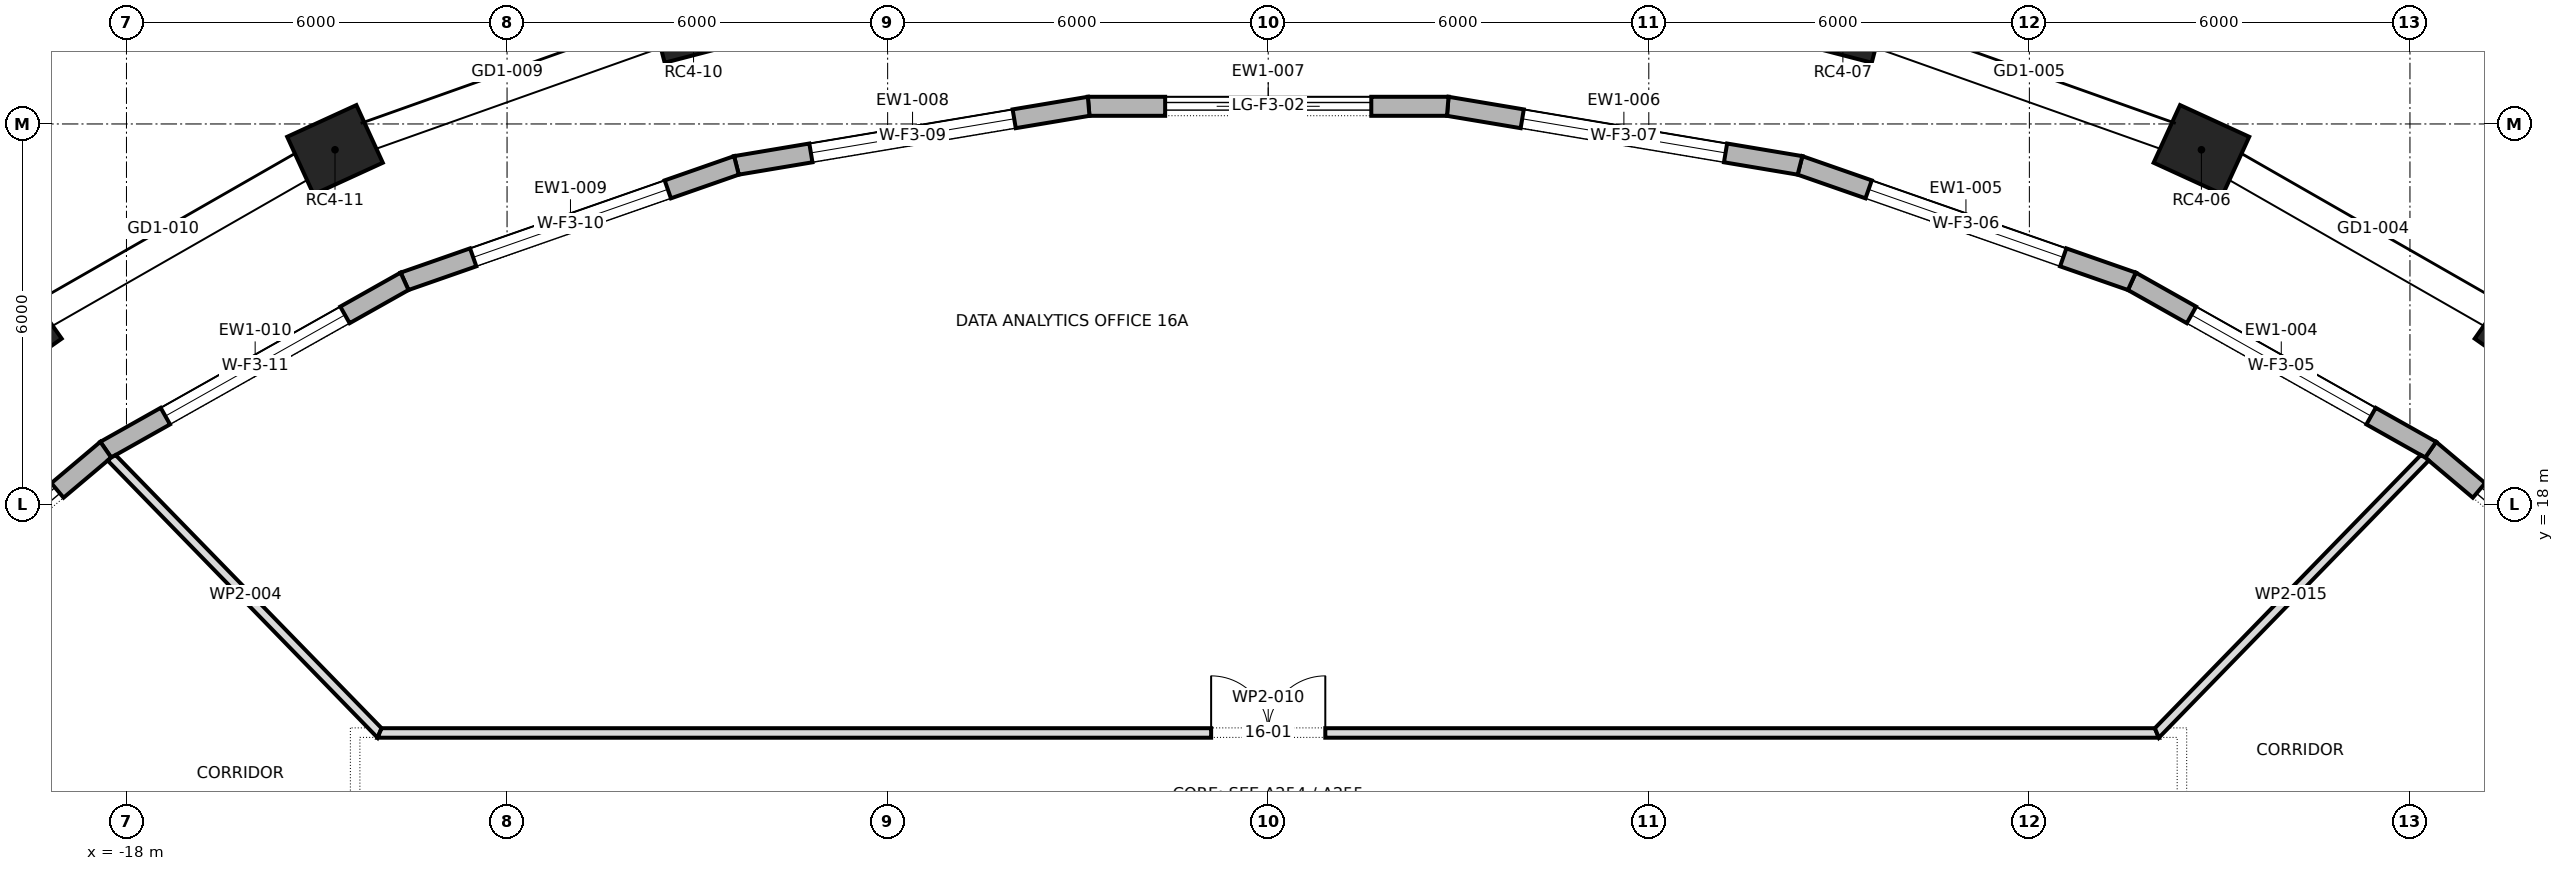
"""IFC4 building model, lengths in metres.
Left out: names, types, materials, properties, quantities, classifications, styles, units other than length and angle.
Written with IfcOpenShell. Run it as: python <this file> out.ifc"""

import sys

from ifc_helpers import new_model, si_unit, direction, frame, frame_2d, origin, origin_2d, place, context, subcontext, project, spatial, polyline, rectangle, outline, extrude, element, fill, save


model = new_model("IFC4")
c1 = context("Model", 3, precision=1e-05, world=origin(), true_north=direction((0.0, 1.0)))
c2 = subcontext(c1, "Body", "Model", "MODEL_VIEW")
j1 = project(units=[si_unit("LENGTHUNIT", "METRE"), si_unit("PLANEANGLEUNIT", "RADIAN")], contexts=[c1])
p1 = place(None, origin())
s1 = spatial("IfcSite", under=j1, at=p1, CompositionType="ELEMENT")
p2 = place(p1, origin())
s2 = spatial("IfcBuilding", under=s1, at=p2, CompositionType="ELEMENT")
p3 = place(p2, frame((0.0, 0.0, 234.9)))
s3 = spatial("IfcBuildingStorey", under=s2, at=p3, CompositionType="ELEMENT", Elevation=234.9)
for number, where, z_axis, x_axis in (
    (1, (19.8, 20.679, 0.0), (0.0, 0.0, 1.0), (-0.818, 0.575, 0.0)),
    (2, (14.712, 23.593, 0.0), (0.0, 0.0, 1.0), (-0.909, 0.417, 0.0)),
    (3, (9.06, 25.6, 0.0), (0.0, 0.0, 1.0), (-0.968, 0.252, 0.0)),
    (4, (-9.06, 25.6, 0.0), (0.0, 0.0, 1.0), (-0.968, -0.252, 0.0)),
    (5, (-14.712, 23.593, 0.0), (0.0, 0.0, 1.0), (-0.909, -0.417, 0.0)),
    (6, (-19.8, 20.679, 0.0), (0.0, 0.0, 1.0), (-0.818, -0.575, 0.0)),
):
    element("IfcColumn", number, at=place(p3, frame(where, z_axis=z_axis, x_axis=x_axis)), inside=s3, PredefinedType="COLUMN", context=c2, shape_type="SweptSolid", body=[
        extrude(rectangle(XDim=1.2, YDim=1.0, at=origin_2d()), origin(), (0.0, 0.0, 1.0), 4.0),
    ])
p4 = place(p3, frame((22.334, 15.486, 0.0), z_axis=(0.0, 0.0, 1.0), x_axis=(-0.764475071601, 0.644653290459, 0.0)))
e7 = element("IfcWall", 7, at=p4, inside=s3, PredefinedType="STANDARD", context=c2, shape_type="SweptSolid", body=[
    extrude(outline(polyline([(-0.015, -0.15), (5.257, -0.15), (5.229, 0.15), (0.015, 0.15), (-0.015, -0.15)])), origin(), (0.0, 0.0, 1.0), 3.7),
])
p5 = place(p4, frame((0.996, 0.0, 0.0)))
e8 = element("IfcOpeningElement", 8, at=p5, cuts=e7, PredefinedType="OPENING", context=c2, shape_type="SweptSolid", body=[
    extrude(rectangle(XDim=3.25, YDim=3.25, at=frame_2d((1.625, 1.625))), frame((0.0, 0.162, 0.0), z_axis=(0.0, -1.0, 0.0), x_axis=(1.0, 0.0, 0.0)), (0.0, 0.0, 1.0), 0.324),
])
p6 = place(p3, frame((18.326, 18.865, 0.0), z_axis=(0.0, 0.0, 1.0), x_axis=(-0.871225596594, 0.490882837181, 0.0)))
e9 = element("IfcWall", 9, at=p6, inside=s3, PredefinedType="STANDARD", context=c2, shape_type="SweptSolid", body=[
    extrude(outline(polyline([(-0.014, -0.15), (5.42, -0.15), (5.393, 0.15), (0.014, 0.15), (-0.014, -0.15)])), origin(), (0.0, 0.0, 1.0), 3.7),
])
p7 = place(p6, frame((1.078, 0.0, 0.6)))
e10 = element("IfcOpeningElement", 10, at=p7, cuts=e9, PredefinedType="OPENING", context=c2, shape_type="SweptSolid", body=[
    extrude(rectangle(XDim=3.25, YDim=2.65, at=frame_2d((1.625, 1.325))), frame((0.0, 0.162, 0.0), z_axis=(0.0, -1.0, 0.0), x_axis=(1.0, 0.0, 0.0)), (0.0, 0.0, 1.0), 0.324),
])
p8 = place(p3, frame((13.616, 21.52, 0.0), z_axis=(0.0, 0.0, 1.0), x_axis=(-0.944075859918, 0.329728328659, 0.0)))
e11 = element("IfcWall", 11, at=p8, inside=s3, PredefinedType="STANDARD", context=c2, shape_type="SweptSolid", body=[
    extrude(outline(polyline([(-0.013, -0.15), (5.555, -0.15), (5.53, 0.15), (0.013, 0.15), (-0.013, -0.15)])), origin(), (0.0, 0.0, 1.0), 3.7),
])
p9 = place(p8, frame((1.146, 0.0, 0.6)))
e12 = element("IfcOpeningElement", 12, at=p9, cuts=e11, PredefinedType="OPENING", context=c2, shape_type="SweptSolid", body=[
    extrude(rectangle(XDim=3.25, YDim=2.65, at=frame_2d((1.625, 1.325))), frame((0.0, 0.162, 0.0), z_axis=(0.0, -1.0, 0.0), x_axis=(1.0, 0.0, 0.0)), (0.0, 0.0, 1.0), 0.324),
])
p10 = place(p3, frame((8.384, 23.347, 0.0), z_axis=(0.0, 0.0, 1.0), x_axis=(-0.986223472554, 0.165418445715, 0.0)))
e13 = element("IfcWall", 13, at=p10, inside=s3, PredefinedType="STANDARD", context=c2, shape_type="SweptSolid", body=[
    extrude(outline(polyline([(-0.013, -0.15), (5.643, -0.15), (5.618, 0.15), (0.013, 0.15), (-0.013, -0.15)])), origin(), (0.0, 0.0, 1.0), 3.7),
])
p11 = place(p10, frame((1.19, 0.0, 0.6)))
e14 = element("IfcOpeningElement", 14, at=p11, cuts=e13, PredefinedType="OPENING", context=c2, shape_type="SweptSolid", body=[
    extrude(rectangle(XDim=3.25, YDim=2.65, at=frame_2d((1.625, 1.325))), frame((0.0, 0.162, 0.0), z_axis=(0.0, -1.0, 0.0), x_axis=(1.0, 0.0, 0.0)), (0.0, 0.0, 1.0), 0.324),
])
p12 = place(p3, frame((2.831, 24.278, 0.0), z_axis=(0.0, 0.0, 1.0), x_axis=(-1.0, 0.0, 0.0)))
e15 = element("IfcWall", 15, at=p12, inside=s3, PredefinedType="STANDARD", context=c2, shape_type="SweptSolid", body=[
    extrude(outline(polyline([(-0.012, -0.15), (5.674, -0.15), (5.649, 0.15), (0.012, 0.15), (-0.012, -0.15)])), origin(), (0.0, 0.0, 1.0), 3.7),
])
p13 = place(p12, frame((1.206, 0.0, 0.0)))
e16 = element("IfcOpeningElement", 16, at=p13, cuts=e15, PredefinedType="OPENING", context=c2, shape_type="SweptSolid", body=[
    extrude(rectangle(XDim=3.25, YDim=3.25, at=frame_2d((1.625, 1.625))), frame((0.0, 0.162, 0.0), z_axis=(0.0, -1.0, 0.0), x_axis=(1.0, 0.0, 0.0)), (0.0, 0.0, 1.0), 0.324),
])
p14 = place(p3, frame((-2.831, 24.278, 0.0), z_axis=(0.0, 0.0, 1.0), x_axis=(-0.986223472554, -0.165418445715, 0.0)))
e17 = element("IfcWall", 17, at=p14, inside=s3, PredefinedType="STANDARD", context=c2, shape_type="SweptSolid", body=[
    extrude(outline(polyline([(-0.012, -0.15), (5.643, -0.15), (5.618, 0.15), (0.012, 0.15), (-0.012, -0.15)])), origin(), (0.0, 0.0, 1.0), 3.7),
])
p15 = place(p14, frame((1.19, 0.0, 0.6)))
e18 = element("IfcOpeningElement", 18, at=p15, cuts=e17, PredefinedType="OPENING", context=c2, shape_type="SweptSolid", body=[
    extrude(rectangle(XDim=3.25, YDim=2.65, at=frame_2d((1.625, 1.325))), frame((0.0, 0.162, 0.0), z_axis=(0.0, -1.0, 0.0), x_axis=(1.0, 0.0, 0.0)), (0.0, 0.0, 1.0), 0.324),
])
p16 = place(p3, frame((-8.384, 23.347, 0.0), z_axis=(0.0, 0.0, 1.0), x_axis=(-0.944075859918, -0.329728328659, 0.0)))
e19 = element("IfcWall", 19, at=p16, inside=s3, PredefinedType="STANDARD", context=c2, shape_type="SweptSolid", body=[
    extrude(outline(polyline([(-0.013, -0.15), (5.556, -0.15), (5.529, 0.15), (0.013, 0.15), (-0.013, -0.15)])), origin(), (0.0, 0.0, 1.0), 3.7),
])
p17 = place(p16, frame((1.146, 0.0, 0.6)))
e20 = element("IfcOpeningElement", 20, at=p17, cuts=e19, PredefinedType="OPENING", context=c2, shape_type="SweptSolid", body=[
    extrude(rectangle(XDim=3.25, YDim=2.65, at=frame_2d((1.625, 1.325))), frame((0.0, 0.162, 0.0), z_axis=(0.0, -1.0, 0.0), x_axis=(1.0, 0.0, 0.0)), (0.0, 0.0, 1.0), 0.324),
])
p18 = place(p3, frame((-13.616, 21.52, 0.0), z_axis=(0.0, 0.0, 1.0), x_axis=(-0.871225596594, -0.490882837181, 0.0)))
e21 = element("IfcWall", 21, at=p18, inside=s3, PredefinedType="STANDARD", context=c2, shape_type="SweptSolid", body=[
    extrude(outline(polyline([(-0.013, -0.15), (5.421, -0.15), (5.393, 0.15), (0.013, 0.15), (-0.013, -0.15)])), origin(), (0.0, 0.0, 1.0), 3.7),
])
p19 = place(p18, frame((1.078, 0.0, 0.6)))
e22 = element("IfcOpeningElement", 22, at=p19, cuts=e21, PredefinedType="OPENING", context=c2, shape_type="SweptSolid", body=[
    extrude(rectangle(XDim=3.25, YDim=2.65, at=frame_2d((1.625, 1.325))), frame((0.0, 0.162, 0.0), z_axis=(0.0, -1.0, 0.0), x_axis=(1.0, 0.0, 0.0)), (0.0, 0.0, 1.0), 0.324),
])
p20 = place(p3, frame((-18.326, 18.865, 0.0), z_axis=(0.0, 0.0, 1.0), x_axis=(-0.764475071601, -0.644653290459, 0.0)))
e23 = element("IfcWall", 23, at=p20, inside=s3, PredefinedType="STANDARD", context=c2, shape_type="SweptSolid", body=[
    extrude(outline(polyline([(-0.014, -0.15), (5.258, -0.15), (5.228, 0.15), (0.014, 0.15), (-0.014, -0.15)])), origin(), (0.0, 0.0, 1.0), 3.7),
])
p21 = place(p20, frame((0.996, 0.0, 0.0)))
e24 = element("IfcOpeningElement", 24, at=p21, cuts=e23, PredefinedType="OPENING", context=c2, shape_type="SweptSolid", body=[
    extrude(rectangle(XDim=3.25, YDim=3.25, at=frame_2d((1.625, 1.625))), frame((0.0, 0.162, 0.0), z_axis=(0.0, -1.0, 0.0), x_axis=(1.0, 0.0, 0.0)), (0.0, 0.0, 1.0), 0.324),
])
p22 = place(p3, frame((-18.242, 18.747, 0.0), z_axis=(0.0, 0.0, 1.0), x_axis=(0.697616683155, -0.716471188105, 0.0)))
e25 = element("IfcWall", 25, at=p22, inside=s3, PredefinedType="PARTITIONING", context=c2, shape_type="SweptSolid", body=[
    extrude(outline(polyline([(0.0, -0.075), (1.525, -0.075), (3.049, -0.075), (4.574, -0.075), (6.099, -0.075), (6.067, 0.0), (6.035, 0.075), (4.533, 0.075), (3.031, 0.075), (1.528, 0.075), (0.025, 0.075), (0.005, -0.002), (0.0, -0.072), (0.0, -0.075)])), origin(), (0.0, 0.0, 1.0), 3.7),
])
p23 = place(p3, frame((-14.368, 9.948, 0.0), z_axis=(0.0, 0.0, 1.0), x_axis=(-0.822511136101, 0.568749005265, 0.0)))
e26 = element("IfcWall", 26, at=p23, inside=s3, PredefinedType="PARTITIONING", context=c2, shape_type="SweptSolid", body=[
    extrude(outline(polyline([(0.0, -0.075), (1.907, -0.075), (3.813, -0.075), (5.72, -0.075), (7.627, -0.075), (9.533, -0.075), (9.554, 0.0), (9.558, 0.069), (9.558, 0.075), (7.662, 0.075), (5.767, 0.075), (3.871, 0.075), (1.975, 0.075), (0.079, 0.075), (0.079, 0.075), (0.079, 0.075), (0.039, 0.0), (0.0, -0.075)])), origin(), (0.0, 0.0, 1.0), 3.7),
])
p24 = place(p3, frame((-14.042, 14.4, 0.0), z_axis=(0.0, 0.0, 1.0), x_axis=(1.0, 0.0, 0.0)))
e27 = element("IfcWall", 27, at=p24, inside=s3, PredefinedType="PARTITIONING", context=c2, shape_type="SweptSolid", body=[
    extrude(outline(polyline([(0.0, -0.075), (1.872, -0.075), (3.745, -0.075), (5.617, -0.075), (7.489, -0.075), (9.361, -0.075), (11.233, -0.075), (13.106, -0.075), (14.978, -0.075), (16.85, -0.075), (18.722, -0.075), (20.594, -0.075), (22.467, -0.075), (24.339, -0.075), (26.211, -0.075), (28.083, -0.075), (28.02, 0.075), (26.023, 0.075), (24.026, 0.075), (22.029, 0.075), (20.032, 0.075), (18.036, 0.075), (16.039, 0.075), (14.042, 0.075), (12.045, 0.075), (10.048, 0.075), (8.051, 0.075), (6.054, 0.075), (4.057, 0.075), (2.06, 0.075), (0.063, 0.075), (0.0, -0.075)])), origin(), (0.0, 0.0, 1.0), 3.7),
])
p25 = place(p24, frame((13.142, 0.0, 0.0)))
e28 = element("IfcOpeningElement", 28, at=p25, cuts=e27, PredefinedType="OPENING", context=c2, shape_type="SweptSolid", body=[
    extrude(rectangle(XDim=1.8, YDim=2.1, at=frame_2d((0.9, 1.05))), frame((0.0, 0.087, 0.0), z_axis=(0.0, -1.0, 0.0), x_axis=(1.0, 0.0, 0.0)), (0.0, 0.0, 1.0), 0.174),
])
p26 = place(p3, frame((13.988, 14.377, 0.0), z_axis=(0.0, 0.0, 1.0), x_axis=(0.697616683155, 0.716471188105, 0.0)))
e29 = element("IfcWall", 29, at=p26, inside=s3, PredefinedType="PARTITIONING", context=c2, shape_type="SweptSolid", body=[
    extrude(outline(polyline([(6.099, -0.075), (6.099, -0.073), (6.094, -0.002), (6.073, 0.075), (4.571, 0.075), (3.068, 0.075), (1.566, 0.075), (0.063, 0.075), (0.032, 0.0), (0.0, -0.075), (1.525, -0.075), (3.05, -0.075), (4.574, -0.075), (6.099, -0.075)])), origin(), (0.0, 0.0, 1.0), 3.7),
])
p27 = place(p3, frame((18.405, 12.733, 0.0), z_axis=(0.0, 0.0, 1.0), x_axis=(0.821978662859, 0.569518285751, 0.0)))
e30 = element("IfcWall", 30, at=p27, inside=s3, PredefinedType="PARTITIONING", context=c2, shape_type="SweptSolid", body=[
    extrude(outline(polyline([(4.652, -0.06), (4.652, -0.055), (4.649, 0.0), (4.633, 0.06), (3.088, 0.06), (1.544, 0.06), (0.0, 0.06), (0.0, -0.051), (0.013, -0.06), (1.56, -0.06), (3.106, -0.06), (4.652, -0.06)])), origin(), (0.0, 0.0, 1.0), 3.7),
])
p28 = place(p5, origin())
e31 = element("IfcDoor", 31, at=p28, inside=s3, OperationType="DOUBLE_DOOR_SLIDING", PredefinedType="DOOR", context=c2, shape_type="SweptSolid", body=[
    extrude(rectangle(XDim=3.25, YDim=3.25, at=frame_2d((1.625, 1.625))), frame((0.0, 0.025, 0.0), z_axis=(0.0, -1.0, 0.0), x_axis=(1.0, 0.0, 0.0)), (0.0, 0.0, 1.0), 0.05),
])
fill(e8, e31)
p29 = place(p7, origin())
e32 = element("IfcWindow", 32, at=p29, inside=s3, PartitioningType="TRIPLE_PANEL_VERTICAL", PredefinedType="WINDOW", context=c2, shape_type="SweptSolid", body=[
    extrude(rectangle(XDim=3.25, YDim=2.65, at=frame_2d((1.625, 1.325))), frame((0.0, 0.03, 0.0), z_axis=(0.0, -1.0, 0.0), x_axis=(1.0, 0.0, 0.0)), (0.0, 0.0, 1.0), 0.06),
])
fill(e10, e32)
p30 = place(p9, origin())
e33 = element("IfcWindow", 33, at=p30, inside=s3, PartitioningType="TRIPLE_PANEL_VERTICAL", PredefinedType="WINDOW", context=c2, shape_type="SweptSolid", body=[
    extrude(rectangle(XDim=3.25, YDim=2.65, at=frame_2d((1.625, 1.325))), frame((0.0, 0.03, 0.0), z_axis=(0.0, -1.0, 0.0), x_axis=(1.0, 0.0, 0.0)), (0.0, 0.0, 1.0), 0.06),
])
fill(e12, e33)
p31 = place(p11, origin())
e34 = element("IfcWindow", 34, at=p31, inside=s3, PartitioningType="TRIPLE_PANEL_VERTICAL", PredefinedType="WINDOW", context=c2, shape_type="SweptSolid", body=[
    extrude(rectangle(XDim=3.25, YDim=2.65, at=frame_2d((1.625, 1.325))), frame((0.0, 0.03, 0.0), z_axis=(0.0, -1.0, 0.0), x_axis=(1.0, 0.0, 0.0)), (0.0, 0.0, 1.0), 0.06),
])
fill(e14, e34)
p32 = place(p13, origin())
e35 = element("IfcDoor", 35, at=p32, inside=s3, OperationType="DOUBLE_DOOR_SLIDING", PredefinedType="DOOR", context=c2, shape_type="SweptSolid", body=[
    extrude(rectangle(XDim=3.25, YDim=3.25, at=frame_2d((1.625, 1.625))), frame((0.0, 0.025, 0.0), z_axis=(0.0, -1.0, 0.0), x_axis=(1.0, 0.0, 0.0)), (0.0, 0.0, 1.0), 0.05),
])
fill(e16, e35)
p33 = place(p15, origin())
e36 = element("IfcWindow", 36, at=p33, inside=s3, PartitioningType="TRIPLE_PANEL_VERTICAL", PredefinedType="WINDOW", context=c2, shape_type="SweptSolid", body=[
    extrude(rectangle(XDim=3.25, YDim=2.65, at=frame_2d((1.625, 1.325))), frame((0.0, 0.03, 0.0), z_axis=(0.0, -1.0, 0.0), x_axis=(1.0, 0.0, 0.0)), (0.0, 0.0, 1.0), 0.06),
])
fill(e18, e36)
p34 = place(p17, origin())
e37 = element("IfcWindow", 37, at=p34, inside=s3, PartitioningType="TRIPLE_PANEL_VERTICAL", PredefinedType="WINDOW", context=c2, shape_type="SweptSolid", body=[
    extrude(rectangle(XDim=3.25, YDim=2.65, at=frame_2d((1.625, 1.325))), frame((0.0, 0.03, 0.0), z_axis=(0.0, -1.0, 0.0), x_axis=(1.0, 0.0, 0.0)), (0.0, 0.0, 1.0), 0.06),
])
fill(e20, e37)
p35 = place(p19, origin())
e38 = element("IfcWindow", 38, at=p35, inside=s3, PartitioningType="TRIPLE_PANEL_VERTICAL", PredefinedType="WINDOW", context=c2, shape_type="SweptSolid", body=[
    extrude(rectangle(XDim=3.25, YDim=2.65, at=frame_2d((1.625, 1.325))), frame((0.0, 0.03, 0.0), z_axis=(0.0, -1.0, 0.0), x_axis=(1.0, 0.0, 0.0)), (0.0, 0.0, 1.0), 0.06),
])
fill(e22, e38)
p36 = place(p21, origin())
e39 = element("IfcDoor", 39, at=p36, inside=s3, OperationType="DOUBLE_DOOR_SLIDING", PredefinedType="DOOR", context=c2, shape_type="SweptSolid", body=[
    extrude(rectangle(XDim=3.25, YDim=3.25, at=frame_2d((1.625, 1.625))), frame((0.0, 0.025, 0.0), z_axis=(0.0, -1.0, 0.0), x_axis=(1.0, 0.0, 0.0)), (0.0, 0.0, 1.0), 0.05),
])
fill(e24, e39)
p37 = place(p25, origin())
e40 = element("IfcDoor", 40, at=p37, inside=s3, OperationType="DOUBLE_DOOR_SINGLE_SWING", PredefinedType="DOOR", context=c2, shape_type="SweptSolid", body=[
    extrude(rectangle(XDim=1.8, YDim=2.1, at=frame_2d((0.9, 1.05))), frame((0.0, 0.025, 0.0), z_axis=(0.0, -1.0, 0.0), x_axis=(1.0, 0.0, 0.0)), (0.0, 0.0, 1.0), 0.05),
])
fill(e28, e40)
save(model, sys.argv[1])
